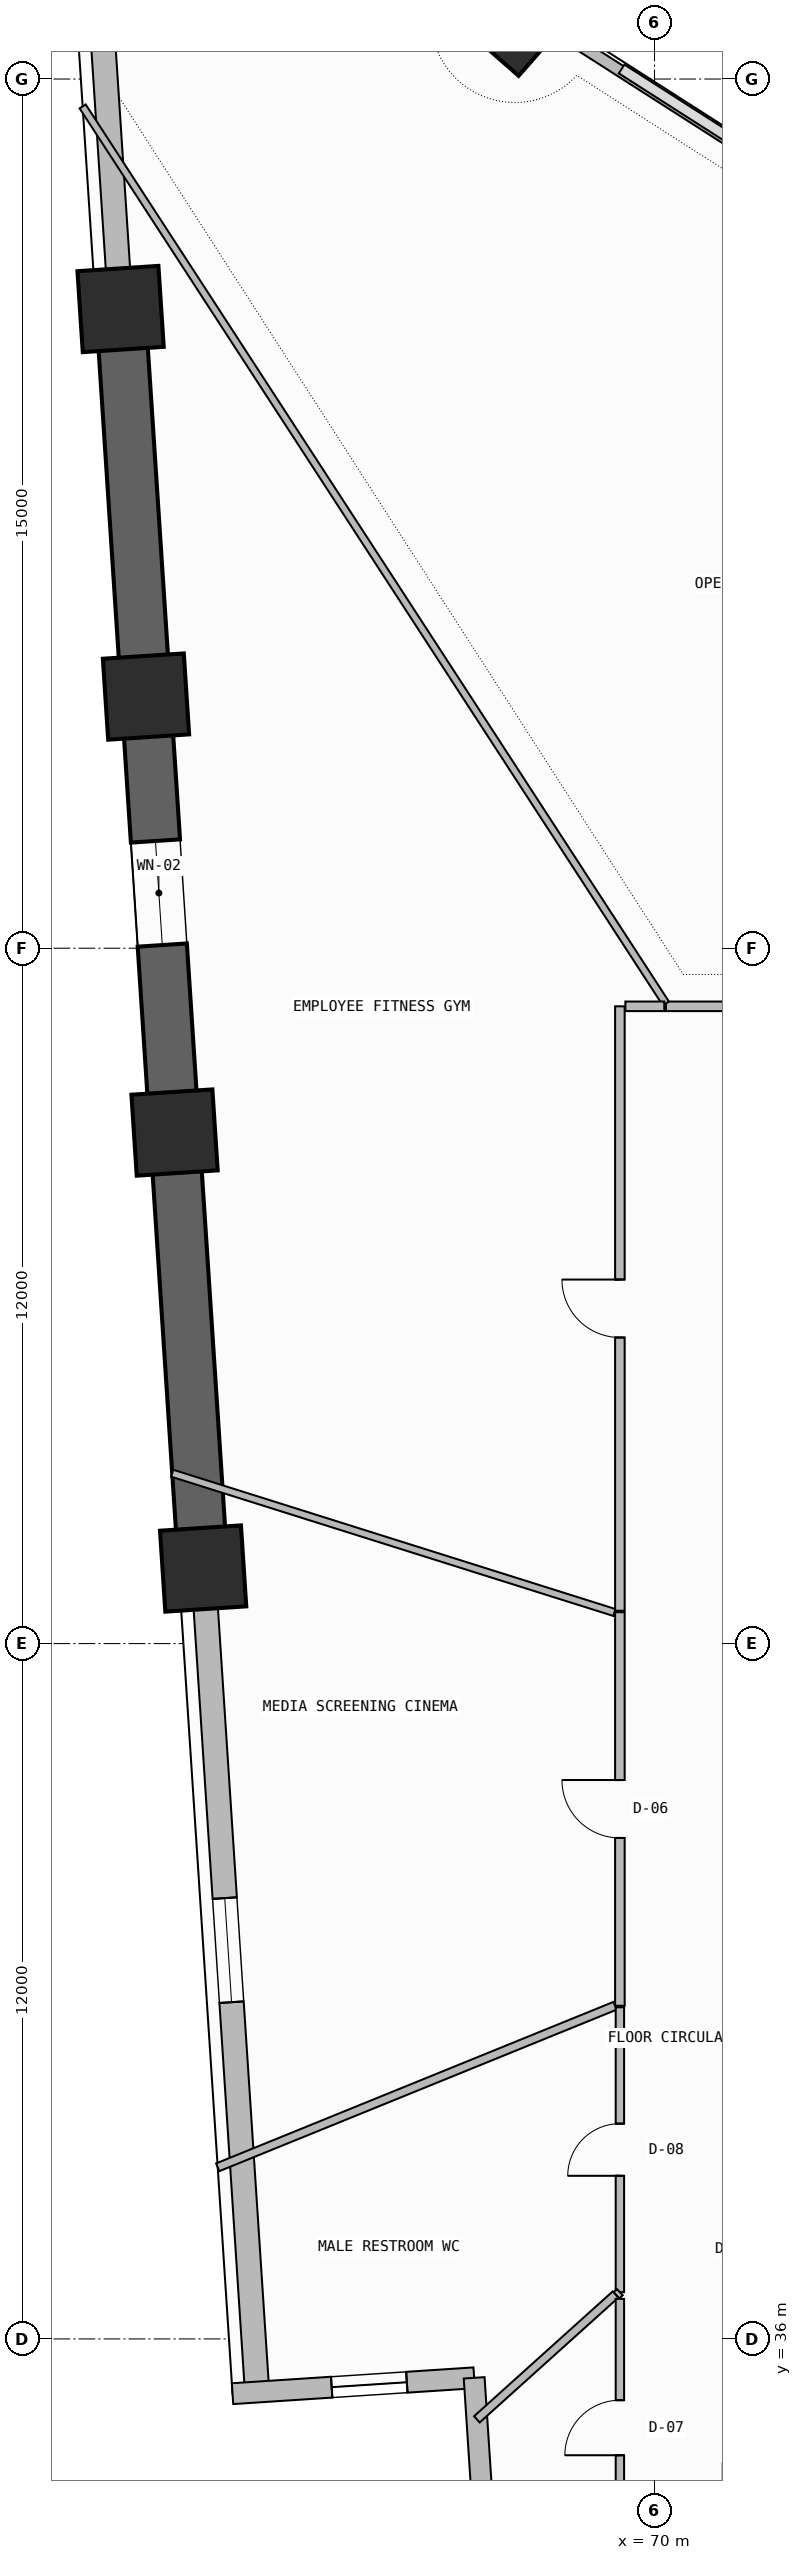
"""IFC4 building model, lengths in metres.
Left out: names, types, materials, properties, quantities, classifications, styles, units other than length and angle.
Written with IfcOpenShell. Run it as: python <this file> out.ifc"""

import sys

from ifc_helpers import new_model, si_unit, direction, frame, frame_2d, origin, origin_2d, place, context, subcontext, project, spatial, rectangle, extrude, element, fill, save


model = new_model("IFC4")
c1 = context("Model", 3, precision=1e-05, world=origin(), true_north=direction((0.0, 1.0)))
c2 = subcontext(c1, "Body", "Model", "MODEL_VIEW")
j1 = project(units=[si_unit("LENGTHUNIT", "METRE"), si_unit("PLANEANGLEUNIT", "RADIAN")], contexts=[c1])
p1 = place(None, origin())
s1 = spatial("IfcSite", under=j1, at=p1, CompositionType="ELEMENT")
p2 = place(p1, origin())
s2 = spatial("IfcBuilding", under=s1, at=p2, CompositionType="ELEMENT")
p3 = place(p2, frame((0.0, 0.0, 77.7)))
s3 = spatial("IfcBuildingStorey", under=s2, at=p3, CompositionType="ELEMENT", Elevation=77.7)
for number, where, z_axis, x_axis in (
    (1, (67.59, 76.043, 0.0), (0.0, 0.0, 1.0), (0.659, 0.752, 0.0)),
    (2, (60.785, 71.031, 0.0), (0.0, 0.0, 1.0), (-0.065, 0.998, 0.0)),
    (3, (61.224, 64.343, 0.0), (0.0, 0.0, 1.0), (-0.065, 0.998, 0.0)),
    (4, (61.717, 56.819, 0.0), (0.0, 0.0, 1.0), (-0.065, 0.998, 0.0)),
    (5, (62.21, 49.295, 0.0), (0.0, 0.0, 1.0), (-0.065, 0.998, 0.0)),
):
    element("IfcColumn", number, at=place(p3, frame(where, z_axis=z_axis, x_axis=x_axis)), inside=s3, PredefinedType="COLUMN", context=c2, shape_type="SweptSolid", body=[
        extrude(rectangle(XDim=1.4, YDim=1.4, at=origin_2d()), origin(), (0.0, 0.0, 1.0), 3.6),
    ])
p4 = place(p3, frame((60.402, 76.883, 0.0), z_axis=(0.0, 0.0, 1.0), x_axis=(0.065402662459, -0.997858953832, 0.0)))
e6 = element("IfcWall", 6, at=p4, inside=s3, PredefinedType="SOLIDWALL", context=c2, shape_type="SweptSolid", body=[
    extrude(rectangle(XDim=5.864, YDim=0.42, at=frame_2d((2.932, 0.0))), origin(), (0.0, 0.0, 1.0), 2.725),
])
p5 = place(p3, frame((60.785, 71.031, -0.26), z_axis=(0.0, 0.0, 1.0), x_axis=(0.065409824833, -0.997858484363, 0.0)))
e7 = element("IfcWall", 7, at=p5, inside=s3, PredefinedType="SHEAR", context=c2, shape_type="SweptSolid", body=[
    extrude(rectangle(XDim=21.783, YDim=0.85, at=frame_2d((10.891, 0.0))), origin(), (0.0, 0.0, 1.0), 3.6),
])
p6 = place(p5, frame((9.2, 0.0, 1.2)))
e8 = element("IfcOpeningElement", 8, at=p6, cuts=e7, PredefinedType="OPENING", context=c2, shape_type="SweptSolid", body=[
    extrude(rectangle(XDim=1.8, YDim=0.9, at=frame_2d((0.9, 0.45))), frame((0.0, 0.435, 0.0), z_axis=(0.0, -1.0, 0.0), x_axis=(1.0, 0.0, 0.0)), (0.0, 0.0, 1.0), 0.87),
])
p7 = place(p3, frame((62.21, 49.295, 0.0), z_axis=(0.0, 0.0, 1.0), x_axis=(0.065396027757, -0.997859388668, 0.0)))
e9 = element("IfcWall", 9, at=p7, inside=s3, PredefinedType="SOLIDWALL", context=c2, shape_type="SweptSolid", body=[
    extrude(rectangle(XDim=14.242, YDim=0.42, at=frame_2d((7.121, 0.0))), origin(), (0.0, 0.0, 1.0), 2.325),
])
p8 = place(p7, frame((5.7, 0.0, 1.2)))
e10 = element("IfcOpeningElement", 10, at=p8, cuts=e9, PredefinedType="OPENING", context=c2, shape_type="SweptSolid", body=[
    extrude(rectangle(XDim=1.8, YDim=0.9, at=frame_2d((0.9, 0.45))), frame((0.0, 0.22, 0.0), z_axis=(0.0, -1.0, 0.0), x_axis=(1.0, 0.0, 0.0)), (0.0, 0.0, 1.0), 0.44),
])
p9 = place(p3, frame((62.718, 35.055, 0.0), z_axis=(0.0, 0.0, 1.0), x_axis=(0.997860761953, 0.065375069826, 0.0)))
e11 = element("IfcWall", 11, at=p9, inside=s3, PredefinedType="SOLIDWALL", context=c2, shape_type="SweptSolid", body=[
    extrude(rectangle(XDim=4.179, YDim=0.36, at=frame_2d((2.089, 0.0))), origin(), (0.0, 0.0, 1.0), 3.34),
])
p10 = place(p9, frame((1.714, 0.0, 0.45)))
e12 = element("IfcOpeningElement", 12, at=p10, cuts=e11, PredefinedType="OPENING", context=c2, shape_type="SweptSolid", body=[
    extrude(rectangle(XDim=1.3, YDim=2.4, at=frame_2d((0.65, 1.2))), frame((0.0, 0.19, 0.0), z_axis=(0.0, -1.0, 0.0), x_axis=(1.0, 0.0, 0.0)), (0.0, 0.0, 1.0), 0.38),
])
p11 = place(p3, frame((66.887, 35.329, 0.0), z_axis=(0.0, 0.0, 1.0), x_axis=(0.065433242561, -0.99785694905, 0.0)))
e13 = element("IfcWall", 13, at=p11, inside=s3, PredefinedType="SOLIDWALL", context=c2, shape_type="SweptSolid", body=[
    extrude(rectangle(XDim=4.179, YDim=0.36, at=frame_2d((2.089, 0.0))), origin(), (0.0, 0.0, 1.0), 3.34),
])
p12 = place(p3, frame((84.682, 65.372, 0.0), z_axis=(0.0, 0.0, 1.0), x_axis=(-0.842418773655, 0.538823356763, 0.0)))
e14 = element("IfcWall", 14, at=p12, inside=s3, PredefinedType="PARAPET", context=c2, shape_type="SweptSolid", body=[
    extrude(rectangle(XDim=19.612, YDim=0.2, at=frame_2d((9.806, 0.0))), origin(), (0.0, 0.0, 1.0), 1.15),
])
p13 = place(p3, frame((69.403, 48.542, 0.0), z_axis=(0.0, 0.0, 1.0), x_axis=(0.0, -1.0, 0.0)))
e15 = element("IfcWall", 15, at=p13, inside=s3, PredefinedType="PARTITIONING", context=c2, shape_type="SweptSolid", body=[
    extrude(rectangle(XDim=6.792, YDim=0.165, at=frame_2d((3.396, 0.0))), origin(), (0.0, 0.0, 1.0), 3.34),
])
p14 = place(p13, frame((2.896, 0.0, 0.0)))
e16 = element("IfcOpeningElement", 16, at=p14, cuts=e15, PredefinedType="OPENING", context=c2, shape_type="SweptSolid", body=[
    extrude(rectangle(XDim=1.0, YDim=2.2, at=frame_2d((0.5, 1.1))), frame((0.0, 0.093, 0.0), z_axis=(0.0, -1.0, 0.0), x_axis=(1.0, 0.0, 0.0)), (0.0, 0.0, 1.0), 0.185),
])
p15 = place(p3, frame((69.319, 41.749, 0.0), z_axis=(0.0, 0.0, 1.0), x_axis=(-0.926394680215, -0.376553975506, 0.0)))
e17 = element("IfcWall", 17, at=p15, inside=s3, PredefinedType="PARTITIONING", context=c2, shape_type="SweptSolid", body=[
    extrude(rectangle(XDim=7.402, YDim=0.145, at=frame_2d((3.701, 0.0))), origin(), (0.0, 0.0, 1.0), 3.34),
])
p16 = place(p3, frame((61.677, 50.94, 0.0), z_axis=(0.0, 0.0, 1.0), x_axis=(0.953821246536, -0.300374815282, 0.0)))
e18 = element("IfcWall", 18, at=p16, inside=s3, PredefinedType="PARTITIONING", context=c2, shape_type="SweptSolid", body=[
    extrude(rectangle(XDim=8.001, YDim=0.125, at=frame_2d((4.0, 0.0))), origin(), (0.0, 0.0, 1.0), 2.325),
])
p17 = place(p3, frame((69.403, 41.723, 0.0), z_axis=(0.0, 0.0, 1.0), x_axis=(0.0, -1.0, 0.0)))
e19 = element("IfcWall", 19, at=p17, inside=s3, PredefinedType="PARTITIONING", context=c2, shape_type="SweptSolid", body=[
    extrude(rectangle(XDim=4.916, YDim=0.145, at=frame_2d((2.458, 0.0))), origin(), (0.0, 0.0, 1.0), 3.34),
])
p18 = place(p17, frame((2.008, 0.0, 0.0)))
e20 = element("IfcOpeningElement", 20, at=p18, cuts=e19, PredefinedType="OPENING", context=c2, shape_type="SweptSolid", body=[
    extrude(rectangle(XDim=0.9, YDim=2.1, at=frame_2d((0.45, 1.05))), frame((0.0, 0.083, 0.0), z_axis=(0.0, -1.0, 0.0), x_axis=(1.0, 0.0, 0.0)), (0.0, 0.0, 1.0), 0.165),
])
p19 = place(p3, frame((69.403, 36.807, 0.0), z_axis=(0.0, 0.0, 1.0), x_axis=(-0.730462531297, -0.682952773164, 0.0)))
e21 = element("IfcWall", 21, at=p19, inside=s3, PredefinedType="PARTITIONING", context=c2, shape_type="SweptSolid", body=[
    extrude(rectangle(XDim=0.082, YDim=0.145, at=frame_2d((0.041, 0.0))), origin(), (0.0, 0.0, 1.0), 3.34),
])
p20 = place(p3, frame((69.328, 36.767, 0.0), z_axis=(0.0, 0.0, 1.0), x_axis=(-0.743211196689, -0.669056886308, 0.0)))
e22 = element("IfcWall", 22, at=p20, inside=s3, PredefinedType="PARTITIONING", context=c2, shape_type="SweptSolid", body=[
    extrude(rectangle(XDim=3.22, YDim=0.145, at=frame_2d((1.61, 0.0))), origin(), (0.0, 0.0, 1.0), 3.34),
])
p21 = place(p3, frame((69.403, 36.691, 0.0), z_axis=(0.0, 0.0, 1.0), x_axis=(0.0, -1.0, 0.0)))
e23 = element("IfcWall", 23, at=p21, inside=s3, PredefinedType="PARTITIONING", context=c2, shape_type="SweptSolid", body=[
    extrude(rectangle(XDim=3.732, YDim=0.145, at=frame_2d((1.866, 0.0))), origin(), (0.0, 0.0, 1.0), 3.34),
])
p22 = place(p21, frame((1.748, 0.0, 0.0)))
e24 = element("IfcOpeningElement", 24, at=p22, cuts=e23, PredefinedType="OPENING", context=c2, shape_type="SweptSolid", body=[
    extrude(rectangle(XDim=0.95, YDim=2.15, at=frame_2d((0.475, 1.075))), frame((0.0, 0.083, 0.0), z_axis=(0.0, -1.0, 0.0), x_axis=(1.0, 0.0, 0.0)), (0.0, 0.0, 1.0), 0.165),
])
p23 = place(p3, frame((80.445, 58.998, 0.0), z_axis=(0.0, 0.0, 1.0), x_axis=(-1.0, 0.0, 0.0)))
e25 = element("IfcWall", 25, at=p23, inside=s3, PredefinedType="PARTITIONING", context=c2, shape_type="SweptSolid", body=[
    extrude(rectangle(XDim=10.248, YDim=0.165, at=frame_2d((5.124, 0.0))), origin(), (0.0, 0.0, 1.0), 2.725),
])
p24 = place(p23, frame((4.624, 0.0, 0.0)))
e26 = element("IfcOpeningElement", 26, at=p24, cuts=e25, PredefinedType="OPENING", context=c2, shape_type="SweptSolid", body=[
    extrude(rectangle(XDim=1.0, YDim=2.2, at=frame_2d((0.5, 1.1))), frame((0.0, 0.093, 0.0), z_axis=(0.0, -1.0, 0.0), x_axis=(1.0, 0.0, 0.0)), (0.0, 0.0, 1.0), 0.185),
])
p25 = place(p3, frame((70.197, 59.046, 0.0), z_axis=(0.0, 0.0, 1.0), x_axis=(-0.54511427763, 0.838361750275, 0.0)))
e27 = element("IfcWall", 27, at=p25, inside=s3, PredefinedType="PARTITIONING", context=c2, shape_type="SweptSolid", body=[
    extrude(rectangle(XDim=18.467, YDim=0.125, at=frame_2d((9.233, 0.0))), origin(), (0.0, 0.0, 1.0), 2.725),
])
p26 = place(p3, frame((69.403, 58.998, 0.0), z_axis=(0.0, 0.0, 1.0), x_axis=(0.0, -1.0, 0.0)))
e28 = element("IfcWall", 28, at=p26, inside=s3, PredefinedType="PARTITIONING", context=c2, shape_type="SweptSolid", body=[
    extrude(rectangle(XDim=10.431, YDim=0.165, at=frame_2d((5.215, 0.0))), origin(), (0.0, 0.0, 1.0), 2.725),
])
p27 = place(p26, frame((4.716, 0.0, 0.0)))
e29 = element("IfcOpeningElement", 29, at=p27, cuts=e28, PredefinedType="OPENING", context=c2, shape_type="SweptSolid", body=[
    extrude(rectangle(XDim=1.0, YDim=2.2, at=frame_2d((0.5, 1.1))), frame((0.0, 0.093, 0.0), z_axis=(0.0, -1.0, 0.0), x_axis=(1.0, 0.0, 0.0)), (0.0, 0.0, 1.0), 0.185),
])
p28 = place(p3, frame((70.168, 58.998, 0.0), z_axis=(0.0, 0.0, 1.0), x_axis=(-1.0, 0.0, 0.0)))
e30 = element("IfcWall", 30, at=p28, inside=s3, PredefinedType="PARTITIONING", context=c2, shape_type="SweptSolid", body=[
    extrude(rectangle(XDim=0.671, YDim=0.165, at=frame_2d((0.335, 0.0))), origin(), (0.0, 0.0, 1.0), 2.725),
])
p29 = place(p6, origin())
e31 = element("IfcWindow", 31, at=p29, inside=s3, PartitioningType="SINGLE_PANEL", PredefinedType="WINDOW", context=c2, shape_type="SweptSolid", body=[
    extrude(rectangle(XDim=1.8, YDim=0.9, at=frame_2d((0.9, 0.45))), frame((0.0, 0.03, 0.0), z_axis=(0.0, -1.0, 0.0), x_axis=(1.0, 0.0, 0.0)), (0.0, 0.0, 1.0), 0.06),
])
fill(e8, e31)
p30 = place(p8, origin())
e32 = element("IfcWindow", 32, at=p30, inside=s3, PartitioningType="SINGLE_PANEL", PredefinedType="WINDOW", context=c2, shape_type="SweptSolid", body=[
    extrude(rectangle(XDim=1.8, YDim=0.9, at=frame_2d((0.9, 0.45))), frame((0.0, 0.03, 0.0), z_axis=(0.0, -1.0, 0.0), x_axis=(1.0, 0.0, 0.0)), (0.0, 0.0, 1.0), 0.06),
])
fill(e10, e32)
p31 = place(p10, origin())
e33 = element("IfcWindow", 33, at=p31, inside=s3, PartitioningType="SINGLE_PANEL", PredefinedType="WINDOW", context=c2, shape_type="SweptSolid", body=[
    extrude(rectangle(XDim=1.3, YDim=2.4, at=frame_2d((0.65, 1.2))), frame((0.0, 0.03, 0.0), z_axis=(0.0, -1.0, 0.0), x_axis=(1.0, 0.0, 0.0)), (0.0, 0.0, 1.0), 0.06),
])
fill(e12, e33)
p32 = place(p14, frame((1.0, 0.0, 0.0), z_axis=(0.0, 0.0, 1.0), x_axis=(-1.0, 0.0, 0.0)))
e34 = element("IfcDoor", 34, at=p32, inside=s3, OperationType="SINGLE_SWING_RIGHT", PredefinedType="DOOR", context=c2, shape_type="SweptSolid", body=[
    extrude(rectangle(XDim=1.0, YDim=2.2, at=frame_2d((0.5, 1.1))), frame((0.0, 0.025, 0.0), z_axis=(0.0, -1.0, 0.0), x_axis=(1.0, 0.0, 0.0)), (0.0, 0.0, 1.0), 0.05),
])
fill(e16, e34)
p33 = place(p18, frame((0.9, 0.0, 0.0), z_axis=(0.0, 0.0, 1.0), x_axis=(-1.0, 0.0, 0.0)))
e35 = element("IfcDoor", 35, at=p33, inside=s3, OperationType="SINGLE_SWING_LEFT", PredefinedType="DOOR", context=c2, shape_type="SweptSolid", body=[
    extrude(rectangle(XDim=0.9, YDim=2.1, at=frame_2d((0.45, 1.05))), frame((0.0, 0.025, 0.0), z_axis=(0.0, -1.0, 0.0), x_axis=(1.0, 0.0, 0.0)), (0.0, 0.0, 1.0), 0.05),
])
fill(e20, e35)
p34 = place(p22, frame((0.95, 0.0, 0.0), z_axis=(0.0, 0.0, 1.0), x_axis=(-1.0, 0.0, 0.0)))
e36 = element("IfcDoor", 36, at=p34, inside=s3, OperationType="SINGLE_SWING_LEFT", PredefinedType="DOOR", context=c2, shape_type="SweptSolid", body=[
    extrude(rectangle(XDim=0.95, YDim=2.15, at=frame_2d((0.475, 1.075))), frame((0.0, 0.025, 0.0), z_axis=(0.0, -1.0, 0.0), x_axis=(1.0, 0.0, 0.0)), (0.0, 0.0, 1.0), 0.05),
])
fill(e24, e36)
p35 = place(p27, frame((1.0, 0.0, 0.0), z_axis=(0.0, 0.0, 1.0), x_axis=(-1.0, 0.0, 0.0)))
e37 = element("IfcDoor", 37, at=p35, inside=s3, OperationType="SINGLE_SWING_RIGHT", PredefinedType="DOOR", context=c2, shape_type="SweptSolid", body=[
    extrude(rectangle(XDim=1.0, YDim=2.2, at=frame_2d((0.5, 1.1))), frame((0.0, 0.025, 0.0), z_axis=(0.0, -1.0, 0.0), x_axis=(1.0, 0.0, 0.0)), (0.0, 0.0, 1.0), 0.05),
])
fill(e29, e37)
save(model, sys.argv[1])
